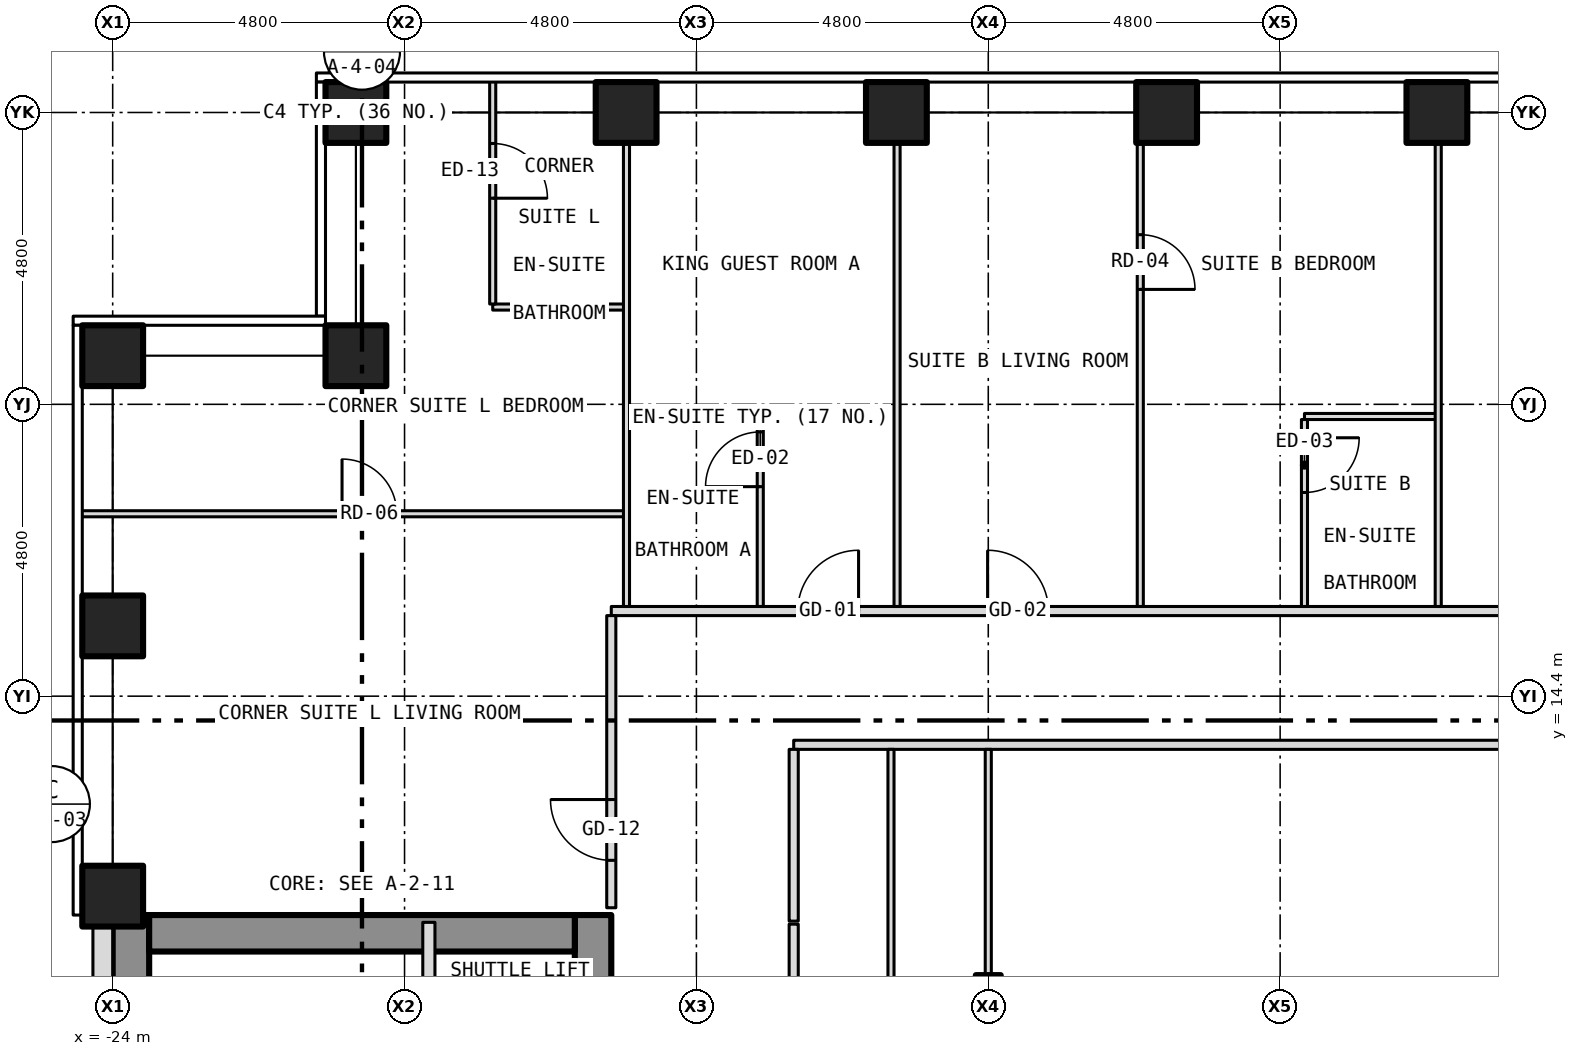
"""IFC4 building model, lengths in metres.
Left out: names, types, materials, properties, quantities, classifications, styles, units other than length and angle.
Written with IfcOpenShell. Run it as: python <this file> out.ifc"""

import sys

from ifc_helpers import new_model, si_unit, direction, frame, frame_2d, origin, origin_2d, place, context, subcontext, project, spatial, rectangle, hollow_rectangle, i_section, extrude, element, fill, save


model = new_model("IFC4")
c1 = context("Model", 3, precision=1e-05, world=origin(), true_north=direction((0.0, 1.0)))
c2 = subcontext(c1, "Body", "Model", "MODEL_VIEW")
j1 = project(units=[si_unit("LENGTHUNIT", "METRE"), si_unit("PLANEANGLEUNIT", "RADIAN")], contexts=[c1])
p1 = place(None, origin())
s1 = spatial("IfcSite", under=j1, at=p1, CompositionType="ELEMENT")
p2 = place(p1, origin())
s2 = spatial("IfcBuilding", under=s1, at=p2, CompositionType="ELEMENT")
p3 = place(p2, frame((0.0, 0.0, 42.5)))
s3 = spatial("IfcBuildingStorey", under=s2, at=p3, CompositionType="ELEMENT", Elevation=42.5)
for number, where, z_axis, x_axis in (
    (1, (-20.0, 24.0, -0.15), (0.0, 0.0, 1.0), (1.0, 0.0, 0.0)),
    (2, (-15.556, 24.0, -0.15), (0.0, 0.0, 1.0), (1.0, 0.0, 0.0)),
    (3, (-11.111, 24.0, -0.15), (0.0, 0.0, 1.0), (1.0, 0.0, 0.0)),
    (4, (-6.667, 24.0, -0.15), (0.0, 0.0, 1.0), (1.0, 0.0, 0.0)),
    (5, (-2.222, 24.0, -0.15), (0.0, 0.0, 1.0), (1.0, 0.0, 0.0)),
    (6, (-24.0, 11.111, -0.15), (0.0, 0.0, 1.0), (1.0, 0.0, 0.0)),
    (7, (-24.0, 15.556, -0.15), (0.0, 0.0, 1.0), (1.0, 0.0, 0.0)),
    (8, (-24.0, 20.0, -0.15), (0.0, 0.0, 1.0), (1.0, 0.0, 0.0)),
    (9, (-20.0, 20.0, -0.15), (0.0, 0.0, 1.0), (1.0, 0.0, 0.0)),
):
    element("IfcColumn", number, at=place(p3, frame(where, z_axis=z_axis, x_axis=x_axis)), inside=s3, PredefinedType="COLUMN", context=c2, shape_type="SweptSolid", body=[
        extrude(hollow_rectangle(XDim=1.0, YDim=1.0, WallThickness=0.06, at=origin_2d()), origin(), (0.0, 0.0, 1.0), 3.5),
    ])
p4 = place(p3, frame((-9.6, 9.6, -0.15), z_axis=(0.0, 0.0, 1.0), x_axis=(1.0, 0.0, 0.0)))
e10 = element("IfcColumn", 10, at=p4, inside=s3, PredefinedType="COLUMN", context=c2, shape_type="SweptSolid", body=[
    extrude(i_section(OverallWidth=0.409, OverallDepth=0.424, WebThickness=0.033, FlangeThickness=0.052, at=origin_2d()), origin(), (0.0, 0.0, 1.0), 3.5),
])
p5 = place(p3, frame((-16.1, -10.8, 0.0), z_axis=(0.0, 0.0, 1.0), x_axis=(0.0, 1.0, 0.0)))
e11 = element("IfcWall", 11, at=p5, inside=s3, PredefinedType="SHEAR", context=c2, shape_type="SweptSolid", body=[
    extrude(rectangle(XDim=21.6, YDim=0.6, at=frame_2d((10.8, 0.0))), origin(), (0.0, 0.0, 1.0), 3.25),
])
p6 = place(p5, frame((9.4, 0.0, 0.0)))
e12 = element("IfcOpeningElement", 12, at=p6, cuts=e11, PredefinedType="OPENING", context=c2, shape_type="SweptSolid", body=[
    extrude(rectangle(XDim=1.1, YDim=2.1, at=frame_2d((0.55, 1.05))), frame((0.0, 0.312, 0.0), z_axis=(0.0, -1.0, 0.0), x_axis=(1.0, 0.0, 0.0)), (0.0, 0.0, 1.0), 0.624),
])
p7 = place(p5, frame((11.5, 0.0, 0.0)))
e13 = element("IfcOpeningElement", 13, at=p7, cuts=e11, PredefinedType="OPENING", context=c2, shape_type="SweptSolid", body=[
    extrude(rectangle(XDim=1.1, YDim=2.1, at=frame_2d((0.55, 1.05))), frame((0.0, 0.312, 0.0), z_axis=(0.0, -1.0, 0.0), x_axis=(1.0, 0.0, 0.0)), (0.0, 0.0, 1.0), 0.624),
])
p8 = place(p5, frame((13.6, 0.0, 0.0)))
e14 = element("IfcOpeningElement", 14, at=p8, cuts=e11, PredefinedType="OPENING", context=c2, shape_type="SweptSolid", body=[
    extrude(rectangle(XDim=1.1, YDim=2.1, at=frame_2d((0.55, 1.05))), frame((0.0, 0.312, 0.0), z_axis=(0.0, -1.0, 0.0), x_axis=(1.0, 0.0, 0.0)), (0.0, 0.0, 1.0), 0.624),
])
p9 = place(p5, frame((15.7, 0.0, 0.0)))
e15 = element("IfcOpeningElement", 15, at=p9, cuts=e11, PredefinedType="OPENING", context=c2, shape_type="SweptSolid", body=[
    extrude(rectangle(XDim=1.1, YDim=2.1, at=frame_2d((0.55, 1.05))), frame((0.0, 0.312, 0.0), z_axis=(0.0, -1.0, 0.0), x_axis=(1.0, 0.0, 0.0)), (0.0, 0.0, 1.0), 0.624),
])
p10 = place(p5, frame((17.8, 0.0, 0.0)))
e16 = element("IfcOpeningElement", 16, at=p10, cuts=e11, PredefinedType="OPENING", context=c2, shape_type="SweptSolid", body=[
    extrude(rectangle(XDim=1.1, YDim=2.1, at=frame_2d((0.55, 1.05))), frame((0.0, 0.312, 0.0), z_axis=(0.0, -1.0, 0.0), x_axis=(1.0, 0.0, 0.0)), (0.0, 0.0, 1.0), 0.624),
])
p11 = place(p5, frame((0.758, 0.0, 0.0)))
e17 = element("IfcOpeningElement", 17, at=p11, cuts=e11, PredefinedType="OPENING", context=c2, shape_type="SweptSolid", body=[
    extrude(rectangle(XDim=1.1, YDim=2.1, at=frame_2d((0.55, 1.05))), frame((0.0, 0.312, 0.0), z_axis=(0.0, -1.0, 0.0), x_axis=(1.0, 0.0, 0.0)), (0.0, 0.0, 1.0), 0.624),
])
p12 = place(p5, frame((7.5, 0.0, 0.0)))
e18 = element("IfcOpeningElement", 18, at=p12, cuts=e11, PredefinedType="OPENING", context=c2, shape_type="SweptSolid", body=[
    extrude(rectangle(XDim=1.1, YDim=2.1, at=frame_2d((0.55, 1.05))), frame((0.0, 0.312, 0.0), z_axis=(0.0, -1.0, 0.0), x_axis=(1.0, 0.0, 0.0)), (0.0, 0.0, 1.0), 0.624),
])
p13 = place(p3, frame((-23.7, -10.8, 0.0), z_axis=(0.0, 0.0, 1.0), x_axis=(0.0, 1.0, 0.0)))
e19 = element("IfcWall", 19, at=p13, inside=s3, PredefinedType="SHEAR", context=c2, shape_type="SweptSolid", body=[
    extrude(rectangle(XDim=21.6, YDim=0.6, at=frame_2d((10.8, 0.0))), origin(), (0.0, 0.0, 1.0), 3.25),
])
p14 = place(p3, frame((-23.4, 10.5, 0.0), z_axis=(0.0, 0.0, 1.0), x_axis=(1.0, 0.0, 0.0)))
e20 = element("IfcWall", 20, at=p14, inside=s3, PredefinedType="SHEAR", context=c2, shape_type="SweptSolid", body=[
    extrude(rectangle(XDim=7.0, YDim=0.6, at=frame_2d((3.5, 0.0))), origin(), (0.0, 0.0, 1.0), 3.25),
])
p15 = place(p3, frame((-24.163, 10.8, 0.0), z_axis=(0.0, 0.0, 1.0), x_axis=(0.0, -1.0, 0.0)))
e21 = element("IfcWall", 21, at=p15, inside=s3, PredefinedType="SOLIDWALL", context=c2, shape_type="SweptSolid", body=[
    extrude(rectangle(XDim=21.6, YDim=0.325, at=frame_2d((10.8, 0.0))), origin(), (0.0, 0.0, 1.0), 3.5),
])
p16 = place(p15, frame((18.05, 0.0, 1.0)))
e22 = element("IfcOpeningElement", 22, at=p16, cuts=e21, PredefinedType="OPENING", context=c2, shape_type="SweptSolid", body=[
    extrude(rectangle(XDim=0.6, YDim=1.5, at=frame_2d((0.3, 0.75))), frame((0.0, 0.175, 0.0), z_axis=(0.0, -1.0, 0.0), x_axis=(1.0, 0.0, 0.0)), (0.0, 0.0, 1.0), 0.349),
])
p17 = place(p3, frame((-12.8, 13.6, 0.0), z_axis=(0.0, 0.0, 1.0), x_axis=(1.0, 0.0, 0.0)))
e23 = element("IfcWall", 23, at=p17, inside=s3, PredefinedType="PARTITIONING", context=c2, shape_type="SweptSolid", body=[
    extrude(rectangle(XDim=25.6, YDim=0.15, at=frame_2d((12.8, 0.0))), origin(), (0.0, 0.0, 1.0), 3.35),
])
p18 = place(p17, frame((12.35, 0.0, 0.0)))
e24 = element("IfcOpeningElement", 24, at=p18, cuts=e23, PredefinedType="OPENING", context=c2, shape_type="SweptSolid", body=[
    extrude(rectangle(XDim=0.9, YDim=2.1, at=frame_2d((0.45, 1.05))), frame((0.0, 0.087, 0.0), z_axis=(0.0, -1.0, 0.0), x_axis=(1.0, 0.0, 0.0)), (0.0, 0.0, 1.0), 0.174),
])
p19 = place(p3, frame((-15.8, 15.8, 0.0), z_axis=(0.0, 0.0, 1.0), x_axis=(1.0, 0.0, 0.0)))
e25 = element("IfcWall", 25, at=p19, inside=s3, PredefinedType="PARTITIONING", context=c2, shape_type="SweptSolid", body=[
    extrude(rectangle(XDim=31.6, YDim=0.15, at=frame_2d((15.8, 0.0))), origin(), (0.0, 0.0, 1.0), 3.35),
])
p20 = place(p19, frame((3.067, 0.0, 0.0)))
e26 = element("IfcOpeningElement", 26, at=p20, cuts=e25, PredefinedType="OPENING", context=c2, shape_type="SweptSolid", body=[
    extrude(rectangle(XDim=1.0, YDim=2.1, at=frame_2d((0.5, 1.05))), frame((0.0, 0.087, 0.0), z_axis=(0.0, -1.0, 0.0), x_axis=(1.0, 0.0, 0.0)), (0.0, 0.0, 1.0), 0.174),
])
p21 = place(p19, frame((6.189, 0.0, 0.0)))
e27 = element("IfcOpeningElement", 27, at=p21, cuts=e25, PredefinedType="OPENING", context=c2, shape_type="SweptSolid", body=[
    extrude(rectangle(XDim=1.0, YDim=2.1, at=frame_2d((0.5, 1.05))), frame((0.0, 0.087, 0.0), z_axis=(0.0, -1.0, 0.0), x_axis=(1.0, 0.0, 0.0)), (0.0, 0.0, 1.0), 0.174),
])
p22 = place(p19, frame((15.311, 0.0, 0.0)))
e28 = element("IfcOpeningElement", 28, at=p22, cuts=e25, PredefinedType="OPENING", context=c2, shape_type="SweptSolid", body=[
    extrude(rectangle(XDim=1.0, YDim=2.1, at=frame_2d((0.5, 1.05))), frame((0.0, 0.087, 0.0), z_axis=(0.0, -1.0, 0.0), x_axis=(1.0, 0.0, 0.0)), (0.0, 0.0, 1.0), 0.174),
])
p23 = place(p19, frame((21.977, 0.0, 0.0)))
e29 = element("IfcOpeningElement", 29, at=p23, cuts=e25, PredefinedType="OPENING", context=c2, shape_type="SweptSolid", body=[
    extrude(rectangle(XDim=1.0, YDim=2.1, at=frame_2d((0.5, 1.05))), frame((0.0, 0.087, 0.0), z_axis=(0.0, -1.0, 0.0), x_axis=(1.0, 0.0, 0.0)), (0.0, 0.0, 1.0), 0.174),
])
p24 = place(p19, frame((27.534, 0.0, 0.0)))
e30 = element("IfcOpeningElement", 30, at=p24, cuts=e25, PredefinedType="OPENING", context=c2, shape_type="SweptSolid", body=[
    extrude(rectangle(XDim=1.0, YDim=2.1, at=frame_2d((0.5, 1.05))), frame((0.0, 0.087, 0.0), z_axis=(0.0, -1.0, 0.0), x_axis=(1.0, 0.0, 0.0)), (0.0, 0.0, 1.0), 0.174),
])
p25 = place(p3, frame((-24.53, 17.4, 0.0), z_axis=(0.0, 0.0, 1.0), x_axis=(1.0, 0.0, 0.0)))
e31 = element("IfcWall", 31, at=p25, inside=s3, PredefinedType="PARTITIONING", context=c2, shape_type="SweptSolid", body=[
    extrude(rectangle(XDim=8.98, YDim=0.1, at=frame_2d((4.49, 0.0))), origin(), (0.0, 0.0, 1.0), 3.35),
])
p26 = place(p25, frame((4.302, 0.0, 0.0)))
e32 = element("IfcOpeningElement", 32, at=p26, cuts=e31, PredefinedType="OPENING", context=c2, shape_type="SweptSolid", body=[
    extrude(rectangle(XDim=0.9, YDim=2.1, at=frame_2d((0.45, 1.05))), frame((0.0, 0.062, 0.0), z_axis=(0.0, -1.0, 0.0), x_axis=(1.0, 0.0, 0.0)), (0.0, 0.0, 1.0), 0.124),
])
for number, where, z_axis, x_axis in (
    (33, (-15.55, 19.0, 0.0), (0.0, 0.0, 1.0), (1.0, 0.0, 0.0)),
    (34, (-4.4, 19.0, 0.0), (0.0, 0.0, 1.0), (1.0, 0.0, 0.0)),
    (35, (-17.75, 20.8, 0.0), (0.0, 0.0, 1.0), (1.0, 0.0, 0.0)),
):
    element("IfcWall", number, at=place(p3, frame(where, z_axis=z_axis, x_axis=x_axis)), inside=s3, PredefinedType="PARTITIONING", context=c2, shape_type="SweptSolid", body=[
        extrude(rectangle(XDim=2.2, YDim=0.1, at=frame_2d((1.1, 0.0))), origin(), (0.0, 0.0, 1.0), 3.35),
    ])
p27 = place(p3, frame((-18.8, -1.8, 0.0), z_axis=(0.0, 0.0, 1.0), x_axis=(0.0, 1.0, 0.0)))
e36 = element("IfcWall", 36, at=p27, inside=s3, PredefinedType="PARTITIONING", context=c2, shape_type="SweptSolid", body=[
    extrude(rectangle(XDim=12.48, YDim=0.2, at=frame_2d((6.24, 0.0))), origin(), (0.0, 0.0, 1.0), 3.25),
])
p28 = place(p3, frame((-17.75, 20.85, 0.0), z_axis=(0.0, 0.0, 1.0), x_axis=(0.0, 1.0, 0.0)))
e37 = element("IfcWall", 37, at=p28, inside=s3, PredefinedType="PARTITIONING", context=c2, shape_type="SweptSolid", body=[
    extrude(rectangle(XDim=3.68, YDim=0.1, at=frame_2d((1.84, 0.0))), origin(), (0.0, 0.0, 1.0), 3.35),
])
p29 = place(p28, frame((1.74, 0.0, 0.0)))
e38 = element("IfcOpeningElement", 38, at=p29, cuts=e37, PredefinedType="OPENING", context=c2, shape_type="SweptSolid", body=[
    extrude(rectangle(XDim=0.9, YDim=2.1, at=frame_2d((0.45, 1.05))), frame((0.0, 0.062, 0.0), z_axis=(0.0, -1.0, 0.0), x_axis=(1.0, 0.0, 0.0)), (0.0, 0.0, 1.0), 0.124),
])
p30 = place(p3, frame((-15.8, 10.92, 0.0), z_axis=(0.0, 0.0, 1.0), x_axis=(0.0, 1.0, 0.0)))
e39 = element("IfcWall", 39, at=p30, inside=s3, PredefinedType="PARTITIONING", context=c2, shape_type="SweptSolid", body=[
    extrude(rectangle(XDim=4.805, YDim=0.15, at=frame_2d((2.403, 0.0))), origin(), (0.0, 0.0, 1.0), 3.35),
])
p31 = place(p30, frame((0.78, 0.0, 0.0)))
e40 = element("IfcOpeningElement", 40, at=p31, cuts=e39, PredefinedType="OPENING", context=c2, shape_type="SweptSolid", body=[
    extrude(rectangle(XDim=1.0, YDim=2.1, at=frame_2d((0.5, 1.05))), frame((0.0, 0.087, 0.0), z_axis=(0.0, -1.0, 0.0), x_axis=(1.0, 0.0, 0.0)), (0.0, 0.0, 1.0), 0.174),
])
p32 = place(p3, frame((-15.55, 15.875, 0.0), z_axis=(0.0, 0.0, 1.0), x_axis=(0.0, 1.0, 0.0)))
e41 = element("IfcWall", 41, at=p32, inside=s3, PredefinedType="PARTITIONING", context=c2, shape_type="SweptSolid", body=[
    extrude(rectangle(XDim=8.005, YDim=0.1, at=frame_2d((4.002, 0.0))), origin(), (0.0, 0.0, 1.0), 3.35),
])
p33 = place(p3, frame((-13.35, 15.875, 0.0), z_axis=(0.0, 0.0, 1.0), x_axis=(0.0, 1.0, 0.0)))
e42 = element("IfcWall", 42, at=p33, inside=s3, PredefinedType="PARTITIONING", context=c2, shape_type="SweptSolid", body=[
    extrude(rectangle(XDim=3.075, YDim=0.1, at=frame_2d((1.538, 0.0))), origin(), (0.0, 0.0, 1.0), 3.35),
])
p34 = place(p33, frame((1.971, 0.0, 0.0)))
e43 = element("IfcOpeningElement", 43, at=p34, cuts=e42, PredefinedType="OPENING", context=c2, shape_type="SweptSolid", body=[
    extrude(rectangle(XDim=0.9, YDim=2.1, at=frame_2d((0.45, 1.05))), frame((0.0, 0.062, 0.0), z_axis=(0.0, -1.0, 0.0), x_axis=(1.0, 0.0, 0.0)), (0.0, 0.0, 1.0), 0.124),
])
p35 = place(p3, frame((-12.8, 3.375, 0.0), z_axis=(0.0, 0.0, 1.0), x_axis=(0.0, 1.0, 0.0)))
e44 = element("IfcWall", 44, at=p35, inside=s3, PredefinedType="PARTITIONING", context=c2, shape_type="SweptSolid", body=[
    extrude(rectangle(XDim=7.275, YDim=0.15, at=frame_2d((3.637, 0.0))), origin(), (0.0, 0.0, 1.0), 3.35),
])
p36 = place(p35, frame((3.175, 0.0, 0.0)))
e45 = element("IfcOpeningElement", 45, at=p36, cuts=e44, PredefinedType="OPENING", context=c2, shape_type="SweptSolid", body=[
    extrude(rectangle(XDim=0.9, YDim=2.1, at=frame_2d((0.45, 1.05))), frame((0.0, 0.087, 0.0), z_axis=(0.0, -1.0, 0.0), x_axis=(1.0, 0.0, 0.0)), (0.0, 0.0, 1.0), 0.174),
])
p37 = place(p3, frame((-12.8, 10.7, 0.0), z_axis=(0.0, 0.0, 1.0), x_axis=(0.0, 1.0, 0.0)))
e46 = element("IfcWall", 46, at=p37, inside=s3, PredefinedType="PARTITIONING", context=c2, shape_type="SweptSolid", body=[
    extrude(rectangle(XDim=2.825, YDim=0.15, at=frame_2d((1.413, 0.0))), origin(), (0.0, 0.0, 1.0), 3.35),
])
p38 = place(p3, frame((-11.2, 3.375, 0.0), z_axis=(0.0, 0.0, 1.0), x_axis=(0.0, 1.0, 0.0)))
e47 = element("IfcWall", 47, at=p38, inside=s3, PredefinedType="PARTITIONING", context=c2, shape_type="SweptSolid", body=[
    extrude(rectangle(XDim=10.15, YDim=0.1, at=frame_2d((5.075, 0.0))), origin(), (0.0, 0.0, 1.0), 3.35),
])
p39 = place(p3, frame((-11.1, 15.875, 0.0), z_axis=(0.0, 0.0, 1.0), x_axis=(0.0, 1.0, 0.0)))
e48 = element("IfcWall", 48, at=p39, inside=s3, PredefinedType="PARTITIONING", context=c2, shape_type="SweptSolid", body=[
    extrude(rectangle(XDim=8.005, YDim=0.1, at=frame_2d((4.002, 0.0))), origin(), (0.0, 0.0, 1.0), 3.35),
])
p40 = place(p3, frame((-9.6, 9.396, 0.0), z_axis=(0.0, 0.0, 1.0), x_axis=(0.0, 1.0, 0.0)))
e49 = element("IfcWall", 49, at=p40, inside=s3, PredefinedType="PARTITIONING", context=c2, shape_type="SweptSolid", body=[
    extrude(rectangle(XDim=0.408, YDim=0.1, at=frame_2d((0.204, 0.0))), origin(), (0.0, 0.0, 1.0), 3.35),
])
p41 = place(p3, frame((-9.6, 9.804, 0.0), z_axis=(0.0, 0.0, 1.0), x_axis=(0.0, 1.0, 0.0)))
e50 = element("IfcWall", 50, at=p41, inside=s3, PredefinedType="PARTITIONING", context=c2, shape_type="SweptSolid", body=[
    extrude(rectangle(XDim=3.721, YDim=0.1, at=frame_2d((1.86, 0.0))), origin(), (0.0, 0.0, 1.0), 2.728),
])
p42 = place(p3, frame((-7.1, 15.875, 0.0), z_axis=(0.0, 0.0, 1.0), x_axis=(0.0, 1.0, 0.0)))
e51 = element("IfcWall", 51, at=p42, inside=s3, PredefinedType="PARTITIONING", context=c2, shape_type="SweptSolid", body=[
    extrude(rectangle(XDim=8.005, YDim=0.1, at=frame_2d((4.002, 0.0))), origin(), (0.0, 0.0, 1.0), 3.35),
])
p43 = place(p42, frame((5.215, 0.0, 0.0)))
e52 = element("IfcOpeningElement", 52, at=p43, cuts=e51, PredefinedType="OPENING", context=c2, shape_type="SweptSolid", body=[
    extrude(rectangle(XDim=0.9, YDim=2.1, at=frame_2d((0.45, 1.05))), frame((0.0, 0.062, 0.0), z_axis=(0.0, -1.0, 0.0), x_axis=(1.0, 0.0, 0.0)), (0.0, 0.0, 1.0), 0.124),
])
p44 = place(p3, frame((-4.4, 15.875, 0.0), z_axis=(0.0, 0.0, 1.0), x_axis=(0.0, 1.0, 0.0)))
e53 = element("IfcWall", 53, at=p44, inside=s3, PredefinedType="PARTITIONING", context=c2, shape_type="SweptSolid", body=[
    extrude(rectangle(XDim=3.075, YDim=0.1, at=frame_2d((1.538, 0.0))), origin(), (0.0, 0.0, 1.0), 3.35),
])
p45 = place(p44, frame((1.875, 0.0, 0.0)))
e54 = element("IfcOpeningElement", 54, at=p45, cuts=e53, PredefinedType="OPENING", context=c2, shape_type="SweptSolid", body=[
    extrude(rectangle(XDim=0.9, YDim=2.1, at=frame_2d((0.45, 1.05))), frame((0.0, 0.062, 0.0), z_axis=(0.0, -1.0, 0.0), x_axis=(1.0, 0.0, 0.0)), (0.0, 0.0, 1.0), 0.124),
])
p46 = place(p3, frame((-2.2, 15.875, 0.0), z_axis=(0.0, 0.0, 1.0), x_axis=(0.0, 1.0, 0.0)))
e55 = element("IfcWall", 55, at=p46, inside=s3, PredefinedType="PARTITIONING", context=c2, shape_type="SweptSolid", body=[
    extrude(rectangle(XDim=8.005, YDim=0.1, at=frame_2d((4.002, 0.0))), origin(), (0.0, 0.0, 1.0), 3.35),
])
p47 = place(p20, origin())
e56 = element("IfcDoor", 56, at=p47, inside=s3, OperationType="SINGLE_SWING_RIGHT", PredefinedType="DOOR", context=c2, shape_type="SweptSolid", body=[
    extrude(rectangle(XDim=1.0, YDim=2.1, at=frame_2d((0.5, 1.05))), frame((0.0, 0.025, 0.0), z_axis=(0.0, -1.0, 0.0), x_axis=(1.0, 0.0, 0.0)), (0.0, 0.0, 1.0), 0.05),
])
fill(e26, e56)
p48 = place(p34, origin())
e57 = element("IfcDoor", 57, at=p48, inside=s3, OperationType="SINGLE_SWING_LEFT", PredefinedType="DOOR", context=c2, shape_type="SweptSolid", body=[
    extrude(rectangle(XDim=0.9, YDim=2.1, at=frame_2d((0.45, 1.05))), frame((0.0, 0.025, 0.0), z_axis=(0.0, -1.0, 0.0), x_axis=(1.0, 0.0, 0.0)), (0.0, 0.0, 1.0), 0.05),
])
fill(e43, e57)
p49 = place(p21, origin())
e58 = element("IfcDoor", 58, at=p49, inside=s3, OperationType="SINGLE_SWING_LEFT", PredefinedType="DOOR", context=c2, shape_type="SweptSolid", body=[
    extrude(rectangle(XDim=1.0, YDim=2.1, at=frame_2d((0.5, 1.05))), frame((0.0, 0.025, 0.0), z_axis=(0.0, -1.0, 0.0), x_axis=(1.0, 0.0, 0.0)), (0.0, 0.0, 1.0), 0.05),
])
fill(e27, e58)
p50 = place(p43, origin())
e59 = element("IfcDoor", 59, at=p50, inside=s3, OperationType="SINGLE_SWING_LEFT", PredefinedType="DOOR", context=c2, shape_type="SweptSolid", body=[
    extrude(rectangle(XDim=0.9, YDim=2.1, at=frame_2d((0.45, 1.05))), frame((0.0, 0.025, 0.0), z_axis=(0.0, -1.0, 0.0), x_axis=(1.0, 0.0, 0.0)), (0.0, 0.0, 1.0), 0.05),
])
fill(e52, e59)
p51 = place(p45, origin())
e60 = element("IfcDoor", 60, at=p51, inside=s3, OperationType="SINGLE_SWING_RIGHT", PredefinedType="DOOR", context=c2, shape_type="SweptSolid", body=[
    extrude(rectangle(XDim=0.9, YDim=2.1, at=frame_2d((0.45, 1.05))), frame((0.0, 0.025, 0.0), z_axis=(0.0, -1.0, 0.0), x_axis=(1.0, 0.0, 0.0)), (0.0, 0.0, 1.0), 0.05),
])
fill(e54, e60)
p52 = place(p31, origin())
e61 = element("IfcDoor", 61, at=p52, inside=s3, OperationType="SINGLE_SWING_RIGHT", PredefinedType="DOOR", context=c2, shape_type="SweptSolid", body=[
    extrude(rectangle(XDim=1.0, YDim=2.1, at=frame_2d((0.5, 1.05))), frame((0.0, 0.025, 0.0), z_axis=(0.0, -1.0, 0.0), x_axis=(1.0, 0.0, 0.0)), (0.0, 0.0, 1.0), 0.05),
])
fill(e40, e61)
p53 = place(p26, origin())
e62 = element("IfcDoor", 62, at=p53, inside=s3, OperationType="SINGLE_SWING_LEFT", PredefinedType="DOOR", context=c2, shape_type="SweptSolid", body=[
    extrude(rectangle(XDim=0.9, YDim=2.1, at=frame_2d((0.45, 1.05))), frame((0.0, 0.025, 0.0), z_axis=(0.0, -1.0, 0.0), x_axis=(1.0, 0.0, 0.0)), (0.0, 0.0, 1.0), 0.05),
])
fill(e32, e62)
p54 = place(p29, origin())
e63 = element("IfcDoor", 63, at=p54, inside=s3, OperationType="SINGLE_SWING_LEFT", PredefinedType="DOOR", context=c2, shape_type="SweptSolid", body=[
    extrude(rectangle(XDim=0.9, YDim=2.1, at=frame_2d((0.45, 1.05))), frame((0.0, 0.025, 0.0), z_axis=(0.0, -1.0, 0.0), x_axis=(1.0, 0.0, 0.0)), (0.0, 0.0, 1.0), 0.05),
])
fill(e38, e63)
save(model, sys.argv[1])
